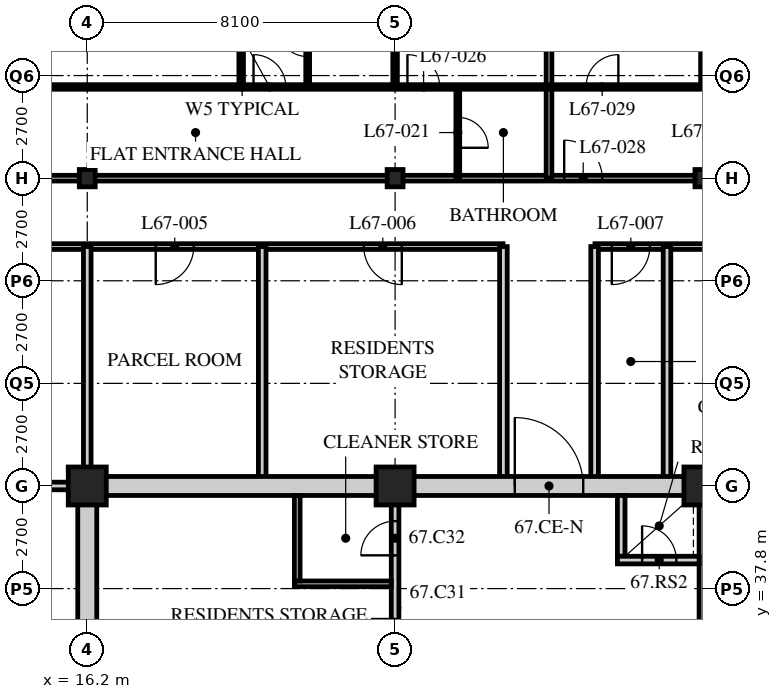
"""IFC4 building model, lengths in metres.
Left out: names, types, materials, properties, quantities, classifications, styles, units other than length and angle.
Written with IfcOpenShell. Run it as: python <this file> out.ifc"""

import sys

from ifc_helpers import new_model, si_unit, direction, frame, frame_2d, origin, origin_2d, place, context, subcontext, project, spatial, rectangle, hollow_rectangle, i_section, extrude, element, fill, save


model = new_model("IFC4")
c1 = context("Model", 3, precision=1e-05, world=origin(), true_north=direction((0.0, 1.0)))
c2 = subcontext(c1, "Body", "Model", "MODEL_VIEW")
j1 = project(units=[si_unit("LENGTHUNIT", "METRE"), si_unit("PLANEANGLEUNIT", "RADIAN")], contexts=[c1])
p1 = place(None, origin())
s1 = spatial("IfcSite", under=j1, at=p1, CompositionType="ELEMENT")
p2 = place(p1, origin())
s2 = spatial("IfcBuilding", under=s1, at=p2, CompositionType="ELEMENT")
p3 = place(p2, frame((0.0, 0.0, 261.9)))
s3 = spatial("IfcBuildingStorey", under=s2, at=p3, CompositionType="ELEMENT", Elevation=261.9)
p4 = place(p3, frame((16.2, 40.5, 0.0), z_axis=(0.0, 0.0, 1.0), x_axis=(1.0, 0.0, 0.0)))
e1 = element("IfcColumn", 1, at=p4, inside=s3, PredefinedType="COLUMN", context=c2, shape_type="SweptSolid", body=[
    extrude(hollow_rectangle(XDim=1.0, YDim=1.0, WallThickness=0.1, at=origin_2d()), origin(), (0.0, 0.0, 1.0), 3.9),
])
p5 = place(p3, frame((16.2, 48.6, 0.0), z_axis=(0.0, 0.0, 1.0), x_axis=(1.0, 0.0, 0.0)))
e2 = element("IfcColumn", 2, at=p5, inside=s3, PredefinedType="COLUMN", context=c2, shape_type="SweptSolid", body=[
    extrude(i_section(OverallWidth=0.418, OverallDepth=0.456, WebThickness=0.042, FlangeThickness=0.067, FilletRadius=0.015, at=origin_2d()), origin(), (0.0, 0.0, 1.0), 3.9),
])
p6 = place(p3, frame((24.3, 40.5, 0.0), z_axis=(0.0, 0.0, 1.0), x_axis=(1.0, 0.0, 0.0)))
e3 = element("IfcColumn", 3, at=p6, inside=s3, PredefinedType="COLUMN", context=c2, shape_type="SweptSolid", body=[
    extrude(hollow_rectangle(XDim=1.0, YDim=1.0, WallThickness=0.1, at=origin_2d()), origin(), (0.0, 0.0, 1.0), 3.9),
])
p7 = place(p3, frame((24.3, 48.6, 0.0), z_axis=(0.0, 0.0, 1.0), x_axis=(1.0, 0.0, 0.0)))
e4 = element("IfcColumn", 4, at=p7, inside=s3, PredefinedType="COLUMN", context=c2, shape_type="SweptSolid", body=[
    extrude(i_section(OverallWidth=0.418, OverallDepth=0.456, WebThickness=0.042, FlangeThickness=0.067, FilletRadius=0.015, at=origin_2d()), origin(), (0.0, 0.0, 1.0), 3.9),
])
p8 = place(p3, frame((32.4, 40.5, 0.0), z_axis=(0.0, 0.0, 1.0), x_axis=(1.0, 0.0, 0.0)))
e5 = element("IfcColumn", 5, at=p8, inside=s3, PredefinedType="COLUMN", context=c2, shape_type="SweptSolid", body=[
    extrude(hollow_rectangle(XDim=1.0, YDim=1.0, WallThickness=0.1, at=origin_2d()), origin(), (0.0, 0.0, 1.0), 3.9),
])
p9 = place(p3, frame((32.4, 48.6, 0.0), z_axis=(0.0, 0.0, 1.0), x_axis=(1.0, 0.0, 0.0)))
e6 = element("IfcColumn", 6, at=p9, inside=s3, PredefinedType="COLUMN", context=c2, shape_type="SweptSolid", body=[
    extrude(i_section(OverallWidth=0.418, OverallDepth=0.456, WebThickness=0.042, FlangeThickness=0.067, FilletRadius=0.015, at=origin_2d()), origin(), (0.0, 0.0, 1.0), 3.9),
])
p10 = place(p3, frame((8.1, 48.6, 0.0), z_axis=(0.0, 0.0, 1.0), x_axis=(1.0, 0.0, 0.0)))
e7 = element("IfcWall", 7, at=p10, inside=s3, PredefinedType="PARTITIONING", context=c2, shape_type="SweptSolid", body=[
    extrude(rectangle(XDim=28.35, YDim=0.15, at=frame_2d((14.175, 0.0))), origin(), (0.0, 0.0, 1.0), 3.078),
])
p11 = place(p10, frame((4.45, 0.0, 0.0)))
e8 = element("IfcOpeningElement", 8, at=p11, cuts=e7, PredefinedType="OPENING", context=c2, shape_type="SweptSolid", body=[
    extrude(rectangle(XDim=1.0, YDim=2.1, at=frame_2d((0.5, 1.05))), frame((0.0, 0.085, 0.0), z_axis=(0.0, -1.0, 0.0), x_axis=(1.0, 0.0, 0.0)), (0.0, 0.0, 1.0), 0.17),
])
p12 = place(p10, frame((20.65, 0.0, 0.0)))
e9 = element("IfcOpeningElement", 9, at=p12, cuts=e7, PredefinedType="OPENING", context=c2, shape_type="SweptSolid", body=[
    extrude(rectangle(XDim=1.0, YDim=2.1, at=frame_2d((0.5, 1.05))), frame((0.0, 0.085, 0.0), z_axis=(0.0, -1.0, 0.0), x_axis=(1.0, 0.0, 0.0)), (0.0, 0.0, 1.0), 0.17),
])
p13 = place(p10, frame((1.525, 0.0, 0.0)))
e10 = element("IfcOpeningElement", 10, at=p13, cuts=e7, PredefinedType="OPENING", context=c2, shape_type="SweptSolid", body=[
    extrude(rectangle(XDim=1.0, YDim=2.1, at=frame_2d((0.5, 1.05))), frame((0.0, 0.085, 0.0), z_axis=(0.0, -1.0, 0.0), x_axis=(1.0, 0.0, 0.0)), (0.0, 0.0, 1.0), 0.17),
])
p14 = place(p3, frame((9.9, 46.8, 0.0), z_axis=(0.0, 0.0, 1.0), x_axis=(1.0, 0.0, 0.0)))
e11 = element("IfcWall", 11, at=p14, inside=s3, PredefinedType="PARTITIONING", context=c2, shape_type="SweptSolid", body=[
    extrude(rectangle(XDim=17.24, YDim=0.15, at=frame_2d((8.62, 0.0))), origin(), (0.0, 0.0, 1.0), 3.69),
])
p15 = place(p14, frame((0.667, 0.0, 0.0)))
e12 = element("IfcOpeningElement", 12, at=p15, cuts=e11, PredefinedType="OPENING", context=c2, shape_type="SweptSolid", body=[
    extrude(rectangle(XDim=1.0, YDim=2.1, at=frame_2d((0.5, 1.05))), frame((0.0, 0.085, 0.0), z_axis=(0.0, -1.0, 0.0), x_axis=(1.0, 0.0, 0.0)), (0.0, 0.0, 1.0), 0.17),
])
p16 = place(p14, frame((3.817, 0.0, 0.0)))
e13 = element("IfcOpeningElement", 13, at=p16, cuts=e11, PredefinedType="OPENING", context=c2, shape_type="SweptSolid", body=[
    extrude(rectangle(XDim=1.0, YDim=2.1, at=frame_2d((0.5, 1.05))), frame((0.0, 0.085, 0.0), z_axis=(0.0, -1.0, 0.0), x_axis=(1.0, 0.0, 0.0)), (0.0, 0.0, 1.0), 0.17),
])
p17 = place(p14, frame((8.102, 0.0, 0.0)))
e14 = element("IfcOpeningElement", 14, at=p17, cuts=e11, PredefinedType="OPENING", context=c2, shape_type="SweptSolid", body=[
    extrude(rectangle(XDim=1.0, YDim=2.1, at=frame_2d((0.5, 1.05))), frame((0.0, 0.085, 0.0), z_axis=(0.0, -1.0, 0.0), x_axis=(1.0, 0.0, 0.0)), (0.0, 0.0, 1.0), 0.17),
])
p18 = place(p14, frame((13.577, 0.0, 0.0)))
e15 = element("IfcOpeningElement", 15, at=p18, cuts=e11, PredefinedType="OPENING", context=c2, shape_type="SweptSolid", body=[
    extrude(rectangle(XDim=1.0, YDim=2.1, at=frame_2d((0.5, 1.05))), frame((0.0, 0.085, 0.0), z_axis=(0.0, -1.0, 0.0), x_axis=(1.0, 0.0, 0.0)), (0.0, 0.0, 1.0), 0.17),
])
p19 = place(p3, frame((29.56, 46.8, 0.0), z_axis=(0.0, 0.0, 1.0), x_axis=(1.0, 0.0, 0.0)))
e16 = element("IfcWall", 16, at=p19, inside=s3, PredefinedType="PARTITIONING", context=c2, shape_type="SweptSolid", body=[
    extrude(rectangle(XDim=6.89, YDim=0.15, at=frame_2d((3.445, 0.0))), origin(), (0.0, 0.0, 1.0), 3.69),
])
p20 = place(p19, frame((0.442, 0.0, 0.0)))
e17 = element("IfcOpeningElement", 17, at=p20, cuts=e16, PredefinedType="OPENING", context=c2, shape_type="SweptSolid", body=[
    extrude(rectangle(XDim=1.0, YDim=2.1, at=frame_2d((0.5, 1.05))), frame((0.0, 0.085, 0.0), z_axis=(0.0, -1.0, 0.0), x_axis=(1.0, 0.0, 0.0)), (0.0, 0.0, 1.0), 0.17),
])
p21 = place(p19, frame((3.642, 0.0, 0.0)))
e18 = element("IfcOpeningElement", 18, at=p21, cuts=e16, PredefinedType="OPENING", context=c2, shape_type="SweptSolid", body=[
    extrude(rectangle(XDim=1.0, YDim=2.1, at=frame_2d((0.5, 1.05))), frame((0.0, 0.085, 0.0), z_axis=(0.0, -1.0, 0.0), x_axis=(1.0, 0.0, 0.0)), (0.0, 0.0, 1.0), 0.17),
])
p22 = place(p3, frame((16.2, 40.5, 0.0), z_axis=(0.0, 0.0, 1.0), x_axis=(0.0, 1.0, 0.0)))
e19 = element("IfcWall", 19, at=p22, inside=s3, PredefinedType="SOLIDWALL", context=c2, shape_type="SweptSolid", body=[
    extrude(rectangle(XDim=6.3, YDim=0.2, at=frame_2d((3.15, 0.0))), origin(), (0.0, 0.0, 1.0), 3.078),
])
for number, where, z_axis, x_axis in (
    (20, (20.803, 46.8, 0.0), (0.0, 0.0, 1.0), (0.0, -1.0, 0.0)),
    (21, (31.455, 46.8, 0.0), (0.0, 0.0, 1.0), (0.0, -1.0, 0.0)),
    (22, (27.15, 40.5, 0.0), (0.0, 0.0, 1.0), (0.0, 1.0, 0.0)),
    (23, (29.55, 40.5, 0.0), (0.0, 0.0, 1.0), (0.0, 1.0, 0.0)),
):
    element("IfcWall", number, at=place(p3, frame(where, z_axis=z_axis, x_axis=x_axis)), inside=s3, PredefinedType="SOLIDWALL", context=c2, shape_type="SweptSolid", body=[
        extrude(rectangle(XDim=6.3, YDim=0.2, at=frame_2d((3.15, 0.0))), origin(), (0.0, 0.0, 1.0), 3.69),
    ])
p23 = place(p3, frame((9.9, 40.5, 0.0), z_axis=(0.0, 0.0, 1.0), x_axis=(1.0, 0.0, 0.0)))
e24 = element("IfcWall", 24, at=p23, inside=s3, PredefinedType="SOLIDWALL", context=c2, shape_type="SweptSolid", body=[
    extrude(rectangle(XDim=6.3, YDim=0.2, at=frame_2d((3.15, 0.0))), origin(), (0.0, 0.0, 1.0), 3.078),
])
p24 = place(p3, frame((25.95, 48.6, 0.0), z_axis=(0.0, 0.0, 1.0), x_axis=(0.0, 1.0, 0.0)))
e25 = element("IfcWall", 25, at=p24, inside=s3, PredefinedType="PARTITIONING", context=c2, shape_type="SweptSolid", body=[
    extrude(rectangle(XDim=2.4, YDim=0.1, at=frame_2d((1.2, 0.0))), origin(), (0.0, 0.0, 1.0), 3.69),
])
p25 = place(p24, frame((0.8, 0.0, 0.0)))
e26 = element("IfcOpeningElement", 26, at=p25, cuts=e25, PredefinedType="OPENING", context=c2, shape_type="SweptSolid", body=[
    extrude(rectangle(XDim=0.8, YDim=2.1, at=frame_2d((0.4, 1.05))), frame((0.0, 0.06, 0.0), z_axis=(0.0, -1.0, 0.0), x_axis=(1.0, 0.0, 0.0)), (0.0, 0.0, 1.0), 0.12),
])
p26 = place(p3, frame((22.0, 51.0, 0.0), z_axis=(0.0, 0.0, 1.0), x_axis=(0.0, 1.0, 0.0)))
e27 = element("IfcWall", 27, at=p26, inside=s3, PredefinedType="PARTITIONING", context=c2, shape_type="SweptSolid", body=[
    extrude(rectangle(XDim=2.4, YDim=0.1, at=frame_2d((1.2, 0.0))), origin(), (0.0, 0.0, 1.0), 3.69),
])
p27 = place(p26, frame((0.8, 0.0, 0.0)))
e28 = element("IfcOpeningElement", 28, at=p27, cuts=e27, PredefinedType="OPENING", context=c2, shape_type="SweptSolid", body=[
    extrude(rectangle(XDim=0.8, YDim=2.1, at=frame_2d((0.4, 1.05))), frame((0.0, 0.06, 0.0), z_axis=(0.0, -1.0, 0.0), x_axis=(1.0, 0.0, 0.0)), (0.0, 0.0, 1.0), 0.12),
])
p28 = place(p3, frame((20.25, 51.0, 0.0), z_axis=(0.0, 0.0, 1.0), x_axis=(0.0, 1.0, 0.0)))
e29 = element("IfcWall", 29, at=p28, inside=s3, PredefinedType="PARTITIONING", context=c2, shape_type="SweptSolid", body=[
    extrude(rectangle(XDim=13.5, YDim=0.12, at=frame_2d((6.75, 0.0))), origin(), (0.0, 0.0, 1.0), 3.69),
])
p29 = place(p3, frame((24.3, 51.0, 0.0), z_axis=(0.0, 0.0, 1.0), x_axis=(0.0, 1.0, 0.0)))
e30 = element("IfcWall", 30, at=p29, inside=s3, PredefinedType="PARTITIONING", context=c2, shape_type="SweptSolid", body=[
    extrude(rectangle(XDim=13.5, YDim=0.12, at=frame_2d((6.75, 0.0))), origin(), (0.0, 0.0, 1.0), 3.078),
])
p30 = place(p3, frame((28.35, 48.6, 0.0), z_axis=(0.0, 0.0, 1.0), x_axis=(0.0, 1.0, 0.0)))
e31 = element("IfcWall", 31, at=p30, inside=s3, PredefinedType="PARTITIONING", context=c2, shape_type="SweptSolid", body=[
    extrude(rectangle(XDim=15.9, YDim=0.15, at=frame_2d((7.95, 0.0))), origin(), (0.0, 0.0, 1.0), 3.69),
])
p31 = place(p3, frame((32.4, 51.0, 0.0), z_axis=(0.0, 0.0, 1.0), x_axis=(0.0, 1.0, 0.0)))
e32 = element("IfcWall", 32, at=p31, inside=s3, PredefinedType="PARTITIONING", context=c2, shape_type="SweptSolid", body=[
    extrude(rectangle(XDim=13.5, YDim=0.12, at=frame_2d((6.75, 0.0))), origin(), (0.0, 0.0, 1.0), 3.078),
])
p32 = place(p3, frame((4.1, 51.0, 0.0), z_axis=(0.0, 0.0, 1.0), x_axis=(1.0, 0.0, 0.0)))
e33 = element("IfcWall", 33, at=p32, inside=s3, PredefinedType="PARTITIONING", context=c2, shape_type="SweptSolid", body=[
    extrude(rectangle(XDim=32.35, YDim=0.12, at=frame_2d((16.175, 0.0))), origin(), (0.0, 0.0, 1.0), 3.69),
])
p33 = place(p32, frame((9.025, 0.0, 0.0)))
e34 = element("IfcOpeningElement", 34, at=p33, cuts=e33, PredefinedType="OPENING", context=c2, shape_type="SweptSolid", body=[
    extrude(rectangle(XDim=0.85, YDim=2.1, at=frame_2d((0.425, 1.05))), frame((0.0, 0.07, 0.0), z_axis=(0.0, -1.0, 0.0), x_axis=(1.0, 0.0, 0.0)), (0.0, 0.0, 1.0), 0.14),
])
p34 = place(p32, frame((16.475, 0.0, 0.0)))
e35 = element("IfcOpeningElement", 35, at=p34, cuts=e33, PredefinedType="OPENING", context=c2, shape_type="SweptSolid", body=[
    extrude(rectangle(XDim=0.85, YDim=2.1, at=frame_2d((0.425, 1.05))), frame((0.0, 0.07, 0.0), z_axis=(0.0, -1.0, 0.0), x_axis=(1.0, 0.0, 0.0)), (0.0, 0.0, 1.0), 0.14),
])
p35 = place(p32, frame((20.525, 0.0, 0.0)))
e36 = element("IfcOpeningElement", 36, at=p35, cuts=e33, PredefinedType="OPENING", context=c2, shape_type="SweptSolid", body=[
    extrude(rectangle(XDim=0.85, YDim=2.1, at=frame_2d((0.425, 1.05))), frame((0.0, 0.07, 0.0), z_axis=(0.0, -1.0, 0.0), x_axis=(1.0, 0.0, 0.0)), (0.0, 0.0, 1.0), 0.14),
])
p36 = place(p32, frame((25.225, 0.0, 0.0)))
e37 = element("IfcOpeningElement", 37, at=p36, cuts=e33, PredefinedType="OPENING", context=c2, shape_type="SweptSolid", body=[
    extrude(rectangle(XDim=0.85, YDim=2.1, at=frame_2d((0.425, 1.05))), frame((0.0, 0.07, 0.0), z_axis=(0.0, -1.0, 0.0), x_axis=(1.0, 0.0, 0.0)), (0.0, 0.0, 1.0), 0.14),
])
p37 = place(p32, frame((28.625, 0.0, 0.0)))
e38 = element("IfcOpeningElement", 38, at=p37, cuts=e33, PredefinedType="OPENING", context=c2, shape_type="SweptSolid", body=[
    extrude(rectangle(XDim=0.85, YDim=2.1, at=frame_2d((0.425, 1.05))), frame((0.0, 0.07, 0.0), z_axis=(0.0, -1.0, 0.0), x_axis=(1.0, 0.0, 0.0)), (0.0, 0.0, 1.0), 0.14),
])
p38 = place(p32, frame((6.725, 0.0, 0.0)))
e39 = element("IfcOpeningElement", 39, at=p38, cuts=e33, PredefinedType="OPENING", context=c2, shape_type="SweptSolid", body=[
    extrude(rectangle(XDim=0.85, YDim=2.1, at=frame_2d((0.425, 1.05))), frame((0.0, 0.07, 0.0), z_axis=(0.0, -1.0, 0.0), x_axis=(1.0, 0.0, 0.0)), (0.0, 0.0, 1.0), 0.14),
])
p39 = place(p32, frame((2.875, 0.0, 0.0)))
e40 = element("IfcOpeningElement", 40, at=p39, cuts=e33, PredefinedType="OPENING", context=c2, shape_type="SweptSolid", body=[
    extrude(rectangle(XDim=0.85, YDim=2.1, at=frame_2d((0.425, 1.05))), frame((0.0, 0.07, 0.0), z_axis=(0.0, -1.0, 0.0), x_axis=(1.0, 0.0, 0.0)), (0.0, 0.0, 1.0), 0.14),
])
p40 = place(p3, frame((15.95, 40.5, 0.0), z_axis=(0.0, 0.0, 1.0), x_axis=(1.0, 0.0, 0.0)))
e41 = element("IfcWall", 41, at=p40, inside=s3, PredefinedType="SOLIDWALL", context=c2, shape_type="SweptSolid", body=[
    extrude(rectangle(XDim=24.55, YDim=0.5, at=frame_2d((12.275, 0.0))), origin(), (0.0, 0.0, 1.0), 3.04),
])
p41 = place(p40, frame((11.5, 0.0, 0.0)))
e42 = element("IfcOpeningElement", 42, at=p41, cuts=e41, PredefinedType="OPENING", context=c2, shape_type="SweptSolid", body=[
    extrude(rectangle(XDim=1.8, YDim=2.4, at=frame_2d((0.9, 1.2))), frame((0.0, 0.26, 0.0), z_axis=(0.0, -1.0, 0.0), x_axis=(1.0, 0.0, 0.0)), (0.0, 0.0, 1.0), 0.52),
])
p42 = place(p3, frame((16.2, 24.55, 0.0), z_axis=(0.0, 0.0, 1.0), x_axis=(0.0, 1.0, 0.0)))
e43 = element("IfcWall", 43, at=p42, inside=s3, PredefinedType="SOLIDWALL", context=c2, shape_type="SweptSolid", body=[
    extrude(rectangle(XDim=15.7, YDim=0.5, at=frame_2d((7.85, 0.0))), origin(), (0.0, 0.0, 1.0), 3.078),
])
p43 = place(p3, frame((32.4, 32.5, 0.0), z_axis=(0.0, 0.0, 1.0), x_axis=(0.0, 1.0, 0.0)))
e44 = element("IfcWall", 44, at=p43, inside=s3, PredefinedType="SOLIDWALL", context=c2, shape_type="SweptSolid", body=[
    extrude(rectangle(XDim=7.75, YDim=0.2, at=frame_2d((3.875, 0.0))), origin(), (0.0, 0.0, 1.0), 3.078),
])
p44 = place(p43, frame((1.9, 0.0, 0.0)))
e45 = element("IfcOpeningElement", 45, at=p44, cuts=e44, PredefinedType="OPENING", context=c2, shape_type="SweptSolid", body=[
    extrude(rectangle(XDim=1.2, YDim=2.1, at=frame_2d((0.6, 1.05))), frame((0.0, 0.11, 0.0), z_axis=(0.0, -1.0, 0.0), x_axis=(1.0, 0.0, 0.0)), (0.0, 0.0, 1.0), 0.22),
])
p45 = place(p3, frame((30.25, 38.65, 0.0), z_axis=(0.0, 0.0, 1.0), x_axis=(0.0, 1.0, 0.0)))
e46 = element("IfcWall", 46, at=p45, inside=s3, PredefinedType="SOLIDWALL", context=c2, shape_type="SweptSolid", body=[
    extrude(rectangle(XDim=1.6, YDim=0.2, at=frame_2d((0.8, 0.0))), origin(), (0.0, 0.0, 1.0), 3.69),
])
p46 = place(p3, frame((30.15, 38.55, 0.0), z_axis=(0.0, 0.0, 1.0), x_axis=(1.0, 0.0, 0.0)))
e47 = element("IfcWall", 47, at=p46, inside=s3, PredefinedType="SOLIDWALL", context=c2, shape_type="SweptSolid", body=[
    extrude(rectangle(XDim=2.15, YDim=0.2, at=frame_2d((1.075, 0.0))), origin(), (0.0, 0.0, 1.0), 3.69),
])
p47 = place(p46, frame((0.65, 0.0, 0.0)))
e48 = element("IfcOpeningElement", 48, at=p47, cuts=e47, PredefinedType="OPENING", context=c2, shape_type="SweptSolid", body=[
    extrude(rectangle(XDim=0.9, YDim=2.1, at=frame_2d((0.45, 1.05))), frame((0.0, 0.11, 0.0), z_axis=(0.0, -1.0, 0.0), x_axis=(1.0, 0.0, 0.0)), (0.0, 0.0, 1.0), 0.22),
])
p48 = place(p3, frame((24.3, 32.5, 0.0), z_axis=(0.0, 0.0, 1.0), x_axis=(0.0, 1.0, 0.0)))
e49 = element("IfcWall", 49, at=p48, inside=s3, PredefinedType="PARTITIONING", context=c2, shape_type="SweptSolid", body=[
    extrude(rectangle(XDim=7.75, YDim=0.2, at=frame_2d((3.875, 0.0))), origin(), (0.0, 0.0, 1.0), 3.078),
])
p49 = place(p48, frame((0.8, 0.0, 0.0)))
e50 = element("IfcOpeningElement", 50, at=p49, cuts=e49, PredefinedType="OPENING", context=c2, shape_type="SweptSolid", body=[
    extrude(rectangle(XDim=1.0, YDim=2.1, at=frame_2d((0.5, 1.05))), frame((0.0, 0.11, 0.0), z_axis=(0.0, -1.0, 0.0), x_axis=(1.0, 0.0, 0.0)), (0.0, 0.0, 1.0), 0.22),
])
p50 = place(p48, frame((3.6, 0.0, 0.0)))
e51 = element("IfcOpeningElement", 51, at=p50, cuts=e49, PredefinedType="OPENING", context=c2, shape_type="SweptSolid", body=[
    extrude(rectangle(XDim=0.9, YDim=2.1, at=frame_2d((0.45, 1.05))), frame((0.0, 0.11, 0.0), z_axis=(0.0, -1.0, 0.0), x_axis=(1.0, 0.0, 0.0)), (0.0, 0.0, 1.0), 0.22),
])
p51 = place(p48, frame((6.175, 0.0, 0.0)))
e52 = element("IfcOpeningElement", 52, at=p51, cuts=e49, PredefinedType="OPENING", context=c2, shape_type="SweptSolid", body=[
    extrude(rectangle(XDim=0.9, YDim=2.1, at=frame_2d((0.45, 1.05))), frame((0.0, 0.11, 0.0), z_axis=(0.0, -1.0, 0.0), x_axis=(1.0, 0.0, 0.0)), (0.0, 0.0, 1.0), 0.22),
])
p52 = place(p3, frame((21.65, 37.925, 0.0), z_axis=(0.0, 0.0, 1.0), x_axis=(1.0, 0.0, 0.0)))
e53 = element("IfcWall", 53, at=p52, inside=s3, PredefinedType="PARTITIONING", context=c2, shape_type="SweptSolid", body=[
    extrude(rectangle(XDim=2.55, YDim=0.15, at=frame_2d((1.275, 0.0))), origin(), (0.0, 0.0, 1.0), 3.69),
])
p53 = place(p3, frame((21.725, 38.0, 0.0), z_axis=(0.0, 0.0, 1.0), x_axis=(0.0, 1.0, 0.0)))
e54 = element("IfcWall", 54, at=p53, inside=s3, PredefinedType="PARTITIONING", context=c2, shape_type="SweptSolid", body=[
    extrude(rectangle(XDim=2.25, YDim=0.15, at=frame_2d((1.125, 0.0))), origin(), (0.0, 0.0, 1.0), 3.69),
])
p54 = place(p17, origin())
e55 = element("IfcDoor", 55, at=p54, inside=s3, OperationType="SINGLE_SWING_RIGHT", PredefinedType="DOOR", context=c2, shape_type="SweptSolid", body=[
    extrude(rectangle(XDim=1.0, YDim=2.1, at=frame_2d((0.5, 1.05))), frame((0.0, 0.025, 0.0), z_axis=(0.0, -1.0, 0.0), x_axis=(1.0, 0.0, 0.0)), (0.0, 0.0, 1.0), 0.05),
])
fill(e14, e55)
p55 = place(p18, origin())
e56 = element("IfcDoor", 56, at=p55, inside=s3, OperationType="SINGLE_SWING_LEFT", PredefinedType="DOOR", context=c2, shape_type="SweptSolid", body=[
    extrude(rectangle(XDim=1.0, YDim=2.1, at=frame_2d((0.5, 1.05))), frame((0.0, 0.025, 0.0), z_axis=(0.0, -1.0, 0.0), x_axis=(1.0, 0.0, 0.0)), (0.0, 0.0, 1.0), 0.05),
])
fill(e15, e56)
p56 = place(p20, origin())
e57 = element("IfcDoor", 57, at=p56, inside=s3, OperationType="SINGLE_SWING_RIGHT", PredefinedType="DOOR", context=c2, shape_type="SweptSolid", body=[
    extrude(rectangle(XDim=1.0, YDim=2.1, at=frame_2d((0.5, 1.05))), frame((0.0, 0.025, 0.0), z_axis=(0.0, -1.0, 0.0), x_axis=(1.0, 0.0, 0.0)), (0.0, 0.0, 1.0), 0.05),
])
fill(e17, e57)
p57 = place(p25, origin())
e58 = element("IfcDoor", 58, at=p57, inside=s3, OperationType="SINGLE_SWING_RIGHT", PredefinedType="DOOR", context=c2, shape_type="SweptSolid", body=[
    extrude(rectangle(XDim=0.8, YDim=2.1, at=frame_2d((0.4, 1.05))), frame((0.0, 0.025, 0.0), z_axis=(0.0, -1.0, 0.0), x_axis=(1.0, 0.0, 0.0)), (0.0, 0.0, 1.0), 0.05),
])
fill(e26, e58)
p58 = place(p27, origin())
e59 = element("IfcDoor", 59, at=p58, inside=s3, OperationType="SINGLE_SWING_RIGHT", PredefinedType="DOOR", context=c2, shape_type="SweptSolid", body=[
    extrude(rectangle(XDim=0.8, YDim=2.1, at=frame_2d((0.4, 1.05))), frame((0.0, 0.025, 0.0), z_axis=(0.0, -1.0, 0.0), x_axis=(1.0, 0.0, 0.0)), (0.0, 0.0, 1.0), 0.05),
])
fill(e28, e59)
p59 = place(p34, origin())
e60 = element("IfcDoor", 60, at=p59, inside=s3, OperationType="SINGLE_SWING_LEFT", PredefinedType="DOOR", context=c2, shape_type="SweptSolid", body=[
    extrude(rectangle(XDim=0.85, YDim=2.1, at=frame_2d((0.425, 1.05))), frame((0.0, 0.025, 0.0), z_axis=(0.0, -1.0, 0.0), x_axis=(1.0, 0.0, 0.0)), (0.0, 0.0, 1.0), 0.05),
])
fill(e35, e60)
p60 = place(p35, origin())
e61 = element("IfcDoor", 61, at=p60, inside=s3, OperationType="SINGLE_SWING_LEFT", PredefinedType="DOOR", context=c2, shape_type="SweptSolid", body=[
    extrude(rectangle(XDim=0.85, YDim=2.1, at=frame_2d((0.425, 1.05))), frame((0.0, 0.025, 0.0), z_axis=(0.0, -1.0, 0.0), x_axis=(1.0, 0.0, 0.0)), (0.0, 0.0, 1.0), 0.05),
])
fill(e36, e61)
p61 = place(p12, origin())
e62 = element("IfcDoor", 62, at=p61, inside=s3, OperationType="SINGLE_SWING_LEFT", PredefinedType="DOOR", context=c2, shape_type="SweptSolid", body=[
    extrude(rectangle(XDim=1.0, YDim=2.1, at=frame_2d((0.5, 1.05))), frame((0.0, 0.025, 0.0), z_axis=(0.0, -1.0, 0.0), x_axis=(1.0, 0.0, 0.0)), (0.0, 0.0, 1.0), 0.05),
])
fill(e9, e62)
p62 = place(p36, origin())
e63 = element("IfcDoor", 63, at=p62, inside=s3, OperationType="SINGLE_SWING_RIGHT", PredefinedType="DOOR", context=c2, shape_type="SweptSolid", body=[
    extrude(rectangle(XDim=0.85, YDim=2.1, at=frame_2d((0.425, 1.05))), frame((0.0, 0.025, 0.0), z_axis=(0.0, -1.0, 0.0), x_axis=(1.0, 0.0, 0.0)), (0.0, 0.0, 1.0), 0.05),
])
fill(e37, e63)
p63 = place(p51, origin())
e64 = element("IfcDoor", 64, at=p63, inside=s3, OperationType="SINGLE_SWING_LEFT", PredefinedType="DOOR", context=c2, shape_type="SweptSolid", body=[
    extrude(rectangle(XDim=0.9, YDim=2.1, at=frame_2d((0.45, 1.05))), frame((0.0, 0.025, 0.0), z_axis=(0.0, -1.0, 0.0), x_axis=(1.0, 0.0, 0.0)), (0.0, 0.0, 1.0), 0.05),
])
fill(e52, e64)
p64 = place(p47, origin())
e65 = element("IfcDoor", 65, at=p64, inside=s3, OperationType="SINGLE_SWING_LEFT", PredefinedType="DOOR", context=c2, shape_type="SweptSolid", body=[
    extrude(rectangle(XDim=0.9, YDim=2.1, at=frame_2d((0.45, 1.05))), frame((0.0, 0.025, 0.0), z_axis=(0.0, -1.0, 0.0), x_axis=(1.0, 0.0, 0.0)), (0.0, 0.0, 1.0), 0.05),
])
fill(e48, e65)
p65 = place(p41, origin())
e66 = element("IfcDoor", 66, at=p65, inside=s3, OperationType="DOUBLE_DOOR_SINGLE_SWING", PredefinedType="DOOR", context=c2, shape_type="SweptSolid", body=[
    extrude(rectangle(XDim=1.8, YDim=2.4, at=frame_2d((0.9, 1.2))), frame((0.0, 0.025, 0.0), z_axis=(0.0, -1.0, 0.0), x_axis=(1.0, 0.0, 0.0)), (0.0, 0.0, 1.0), 0.05),
])
fill(e42, e66)
save(model, sys.argv[1])
